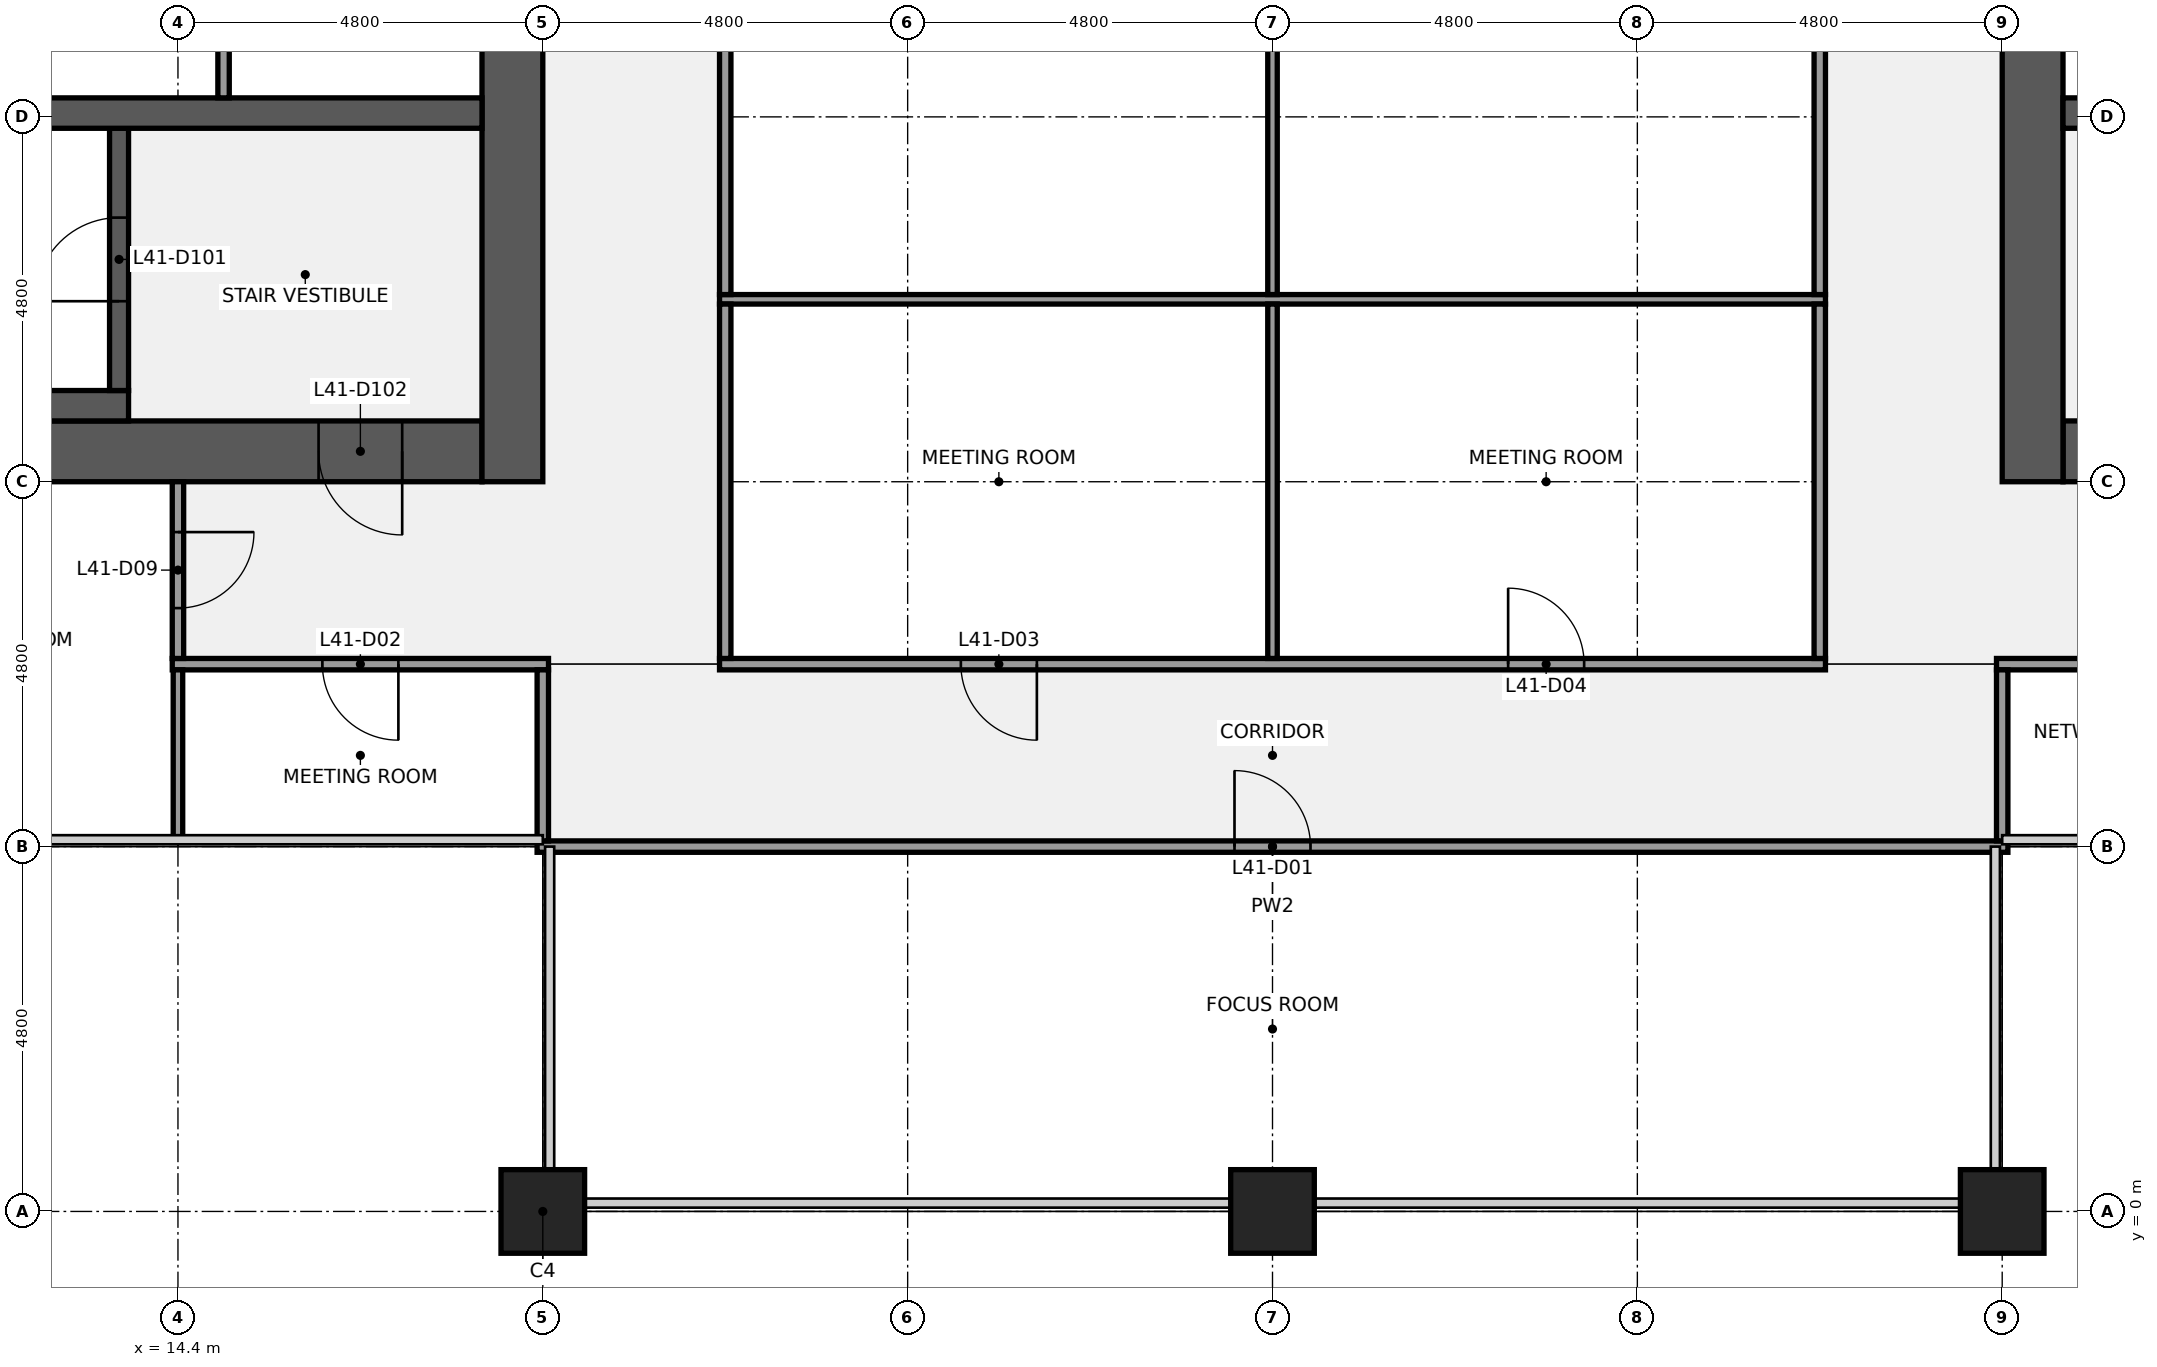
"""IFC4 building model, lengths in metres.
Left out: names, types, materials, properties, quantities, classifications, styles, units other than length and angle.
Written with IfcOpenShell. Run it as: python <this file> out.ifc"""

import sys

from ifc_helpers import new_model, si_unit, direction, frame, frame_2d, origin, origin_2d, place, context, subcontext, project, spatial, rectangle, extrude, element, fill, save


model = new_model("IFC4")
c1 = context("Model", 3, precision=1e-05, world=origin(), true_north=direction((0.0, 1.0)))
c2 = subcontext(c1, "Body", "Model", "MODEL_VIEW")
j1 = project(units=[si_unit("LENGTHUNIT", "METRE"), si_unit("PLANEANGLEUNIT", "RADIAN")], contexts=[c1])
p1 = place(None, origin())
s1 = spatial("IfcSite", under=j1, at=p1, CompositionType="ELEMENT")
p2 = place(p1, origin())
s2 = spatial("IfcBuilding", under=s1, at=p2, CompositionType="ELEMENT")
p3 = place(p2, frame((0.0, 0.0, 193.2)))
s3 = spatial("IfcBuildingStorey", under=s2, at=p3, CompositionType="ELEMENT", Elevation=193.2)
for number, where, z_axis, x_axis in (
    (1, (19.2, 0.0, 0.0), (0.0, 0.0, 1.0), (1.0, 0.0, 0.0)),
    (2, (28.8, 0.0, 0.0), (0.0, 0.0, 1.0), (1.0, 0.0, 0.0)),
    (3, (38.4, 0.0, 0.0), (0.0, 0.0, 1.0), (1.0, 0.0, 0.0)),
):
    element("IfcColumn", number, at=place(p3, frame(where, z_axis=z_axis, x_axis=x_axis)), inside=s3, PredefinedType="COLUMN", context=c2, shape_type="SweptSolid", body=[
        extrude(rectangle(XDim=1.1, YDim=1.1, at=origin_2d()), origin(), (0.0, 0.0, 1.0), 4.0),
    ])
p4 = place(p3, frame((18.4, 10.0, 0.0), z_axis=(0.0, 0.0, 1.0), x_axis=(-1.0, 0.0, 0.0)))
e4 = element("IfcWall", 4, at=p4, inside=s3, PredefinedType="SHEAR", context=c2, shape_type="SweptSolid", body=[
    extrude(rectangle(XDim=8.8, YDim=0.8, at=frame_2d((4.4, 0.0))), origin(), (0.0, 0.0, 1.0), 3.84),
])
p5 = place(p4, frame((1.05, 0.0, 0.0)))
e5 = element("IfcOpeningElement", 5, at=p5, cuts=e4, PredefinedType="OPENING", context=c2, shape_type="SweptSolid", body=[
    extrude(rectangle(XDim=1.1, YDim=2.1, at=frame_2d((0.55, 1.05))), frame((0.0, 0.41, 0.0), z_axis=(0.0, -1.0, 0.0), x_axis=(1.0, 0.0, 0.0)), (0.0, 0.0, 1.0), 0.82),
])
p6 = place(p3, frame((18.8, 38.4, 0.0), z_axis=(0.0, 0.0, 1.0), x_axis=(0.0, -1.0, 0.0)))
e6 = element("IfcWall", 6, at=p6, inside=s3, PredefinedType="SHEAR", context=c2, shape_type="SweptSolid", body=[
    extrude(rectangle(XDim=28.8, YDim=0.8, at=frame_2d((14.4, 0.0))), origin(), (0.0, 0.0, 1.0), 3.84),
])
p7 = place(p6, frame((18.3, 0.0, 0.0)))
e7 = element("IfcOpeningElement", 7, at=p7, cuts=e6, PredefinedType="OPENING", context=c2, shape_type="SweptSolid", body=[
    extrude(rectangle(XDim=1.8, YDim=2.1, at=frame_2d((0.9, 1.05))), frame((0.0, 0.41, 0.0), z_axis=(0.0, -1.0, 0.0), x_axis=(1.0, 0.0, 0.0)), (0.0, 0.0, 1.0), 0.82),
])
p8 = place(p6, frame((8.7, 0.0, 0.0)))
e8 = element("IfcOpeningElement", 8, at=p8, cuts=e6, PredefinedType="OPENING", context=c2, shape_type="SweptSolid", body=[
    extrude(rectangle(XDim=1.8, YDim=2.1, at=frame_2d((0.9, 1.05))), frame((0.0, 0.41, 0.0), z_axis=(0.0, -1.0, 0.0), x_axis=(1.0, 0.0, 0.0)), (0.0, 0.0, 1.0), 0.82),
])
p9 = place(p3, frame((9.6, 10.6, 0.0), z_axis=(0.0, 0.0, 1.0), x_axis=(1.0, 0.0, 0.0)))
e9 = element("IfcWall", 9, at=p9, inside=s3, PredefinedType="SHEAR", context=c2, shape_type="SweptSolid", body=[
    extrude(rectangle(XDim=4.15, YDim=0.4, at=frame_2d((2.075, 0.0))), origin(), (0.0, 0.0, 1.0), 3.84),
])
p10 = place(p3, frame((13.625, 10.8, 0.0), z_axis=(0.0, 0.0, 1.0), x_axis=(0.0, 1.0, 0.0)))
e10 = element("IfcWall", 10, at=p10, inside=s3, PredefinedType="SHEAR", context=c2, shape_type="SweptSolid", body=[
    extrude(rectangle(XDim=3.45, YDim=0.25, at=frame_2d((1.725, 0.0))), origin(), (0.0, 0.0, 1.0), 3.84),
])
p11 = place(p10, frame((1.175, 0.0, 0.0)))
e11 = element("IfcOpeningElement", 11, at=p11, cuts=e10, PredefinedType="OPENING", context=c2, shape_type="SweptSolid", body=[
    extrude(rectangle(XDim=1.1, YDim=2.1, at=frame_2d((0.55, 1.05))), frame((0.0, 0.135, 0.0), z_axis=(0.0, -1.0, 0.0), x_axis=(1.0, 0.0, 0.0)), (0.0, 0.0, 1.0), 0.27),
])
p12 = place(p3, frame((0.8, 14.45, 0.0), z_axis=(0.0, 0.0, 1.0), x_axis=(1.0, 0.0, 0.0)))
e12 = element("IfcWall", 12, at=p12, inside=s3, PredefinedType="SHEAR", context=c2, shape_type="SweptSolid", body=[
    extrude(rectangle(XDim=17.6, YDim=0.4, at=frame_2d((8.8, 0.0))), origin(), (0.0, 0.0, 1.0), 3.84),
])
p13 = place(p3, frame((15.0, 14.65, 0.0), z_axis=(0.0, 0.0, 1.0), x_axis=(0.0, 1.0, 0.0)))
e13 = element("IfcWall", 13, at=p13, inside=s3, PredefinedType="PARTITIONING", context=c2, shape_type="SweptSolid", body=[
    extrude(rectangle(XDim=2.6, YDim=0.15, at=frame_2d((1.3, 0.0))), origin(), (0.0, 0.0, 1.0), 3.84),
])
p14 = place(p3, frame((48.0, 10.0, 0.0), z_axis=(0.0, 0.0, 1.0), x_axis=(-1.0, 0.0, 0.0)))
e14 = element("IfcWall", 14, at=p14, inside=s3, PredefinedType="SHEAR", context=c2, shape_type="SweptSolid", body=[
    extrude(rectangle(XDim=8.8, YDim=0.8, at=frame_2d((4.4, 0.0))), origin(), (0.0, 0.0, 1.0), 3.84),
])
p15 = place(p14, frame((6.65, 0.0, 0.0)))
e15 = element("IfcOpeningElement", 15, at=p15, cuts=e14, PredefinedType="OPENING", context=c2, shape_type="SweptSolid", body=[
    extrude(rectangle(XDim=1.1, YDim=2.1, at=frame_2d((0.55, 1.05))), frame((0.0, 0.41, 0.0), z_axis=(0.0, -1.0, 0.0), x_axis=(1.0, 0.0, 0.0)), (0.0, 0.0, 1.0), 0.82),
])
p16 = place(p3, frame((38.8, 9.6, 0.0), z_axis=(0.0, 0.0, 1.0), x_axis=(0.0, 1.0, 0.0)))
e16 = element("IfcWall", 16, at=p16, inside=s3, PredefinedType="SHEAR", context=c2, shape_type="SweptSolid", body=[
    extrude(rectangle(XDim=28.8, YDim=0.8, at=frame_2d((14.4, 0.0))), origin(), (0.0, 0.0, 1.0), 3.84),
])
p17 = place(p16, frame((8.7, 0.0, 0.0)))
e17 = element("IfcOpeningElement", 17, at=p17, cuts=e16, PredefinedType="OPENING", context=c2, shape_type="SweptSolid", body=[
    extrude(rectangle(XDim=1.8, YDim=2.1, at=frame_2d((0.9, 1.05))), frame((0.0, 0.41, 0.0), z_axis=(0.0, -1.0, 0.0), x_axis=(1.0, 0.0, 0.0)), (0.0, 0.0, 1.0), 0.82),
])
p18 = place(p16, frame((18.3, 0.0, 0.0)))
e18 = element("IfcOpeningElement", 18, at=p18, cuts=e16, PredefinedType="OPENING", context=c2, shape_type="SweptSolid", body=[
    extrude(rectangle(XDim=1.8, YDim=2.1, at=frame_2d((0.9, 1.05))), frame((0.0, 0.41, 0.0), z_axis=(0.0, -1.0, 0.0), x_axis=(1.0, 0.0, 0.0)), (0.0, 0.0, 1.0), 0.82),
])
p19 = place(p3, frame((39.2, 14.45, 0.0), z_axis=(0.0, 0.0, 1.0), x_axis=(1.0, 0.0, 0.0)))
e19 = element("IfcWall", 19, at=p19, inside=s3, PredefinedType="SHEAR", context=c2, shape_type="SweptSolid", body=[
    extrude(rectangle(XDim=17.6, YDim=0.4, at=frame_2d((8.8, 0.0))), origin(), (0.0, 0.0, 1.0), 3.84),
])
p20 = place(p3, frame((19.125, 4.8, 0.0), z_axis=(0.0, 0.0, 1.0), x_axis=(1.0, 0.0, 0.0)))
e20 = element("IfcWall", 20, at=p20, inside=s3, PredefinedType="PARTITIONING", context=c2, shape_type="SweptSolid", body=[
    extrude(rectangle(XDim=19.35, YDim=0.15, at=frame_2d((9.675, 0.0))), origin(), (0.0, 0.0, 1.0), 2.849),
])
p21 = place(p20, frame((9.175, 0.0, 0.0)))
e21 = element("IfcOpeningElement", 21, at=p21, cuts=e20, PredefinedType="OPENING", context=c2, shape_type="SweptSolid", body=[
    extrude(rectangle(XDim=1.0, YDim=2.1, at=frame_2d((0.5, 1.05))), frame((0.0, 0.085, 0.0), z_axis=(0.0, -1.0, 0.0), x_axis=(1.0, 0.0, 0.0)), (0.0, 0.0, 1.0), 0.17),
])
p22 = place(p3, frame((14.325, 7.2, 0.0), z_axis=(0.0, 0.0, 1.0), x_axis=(1.0, 0.0, 0.0)))
e22 = element("IfcWall", 22, at=p22, inside=s3, PredefinedType="PARTITIONING", context=c2, shape_type="SweptSolid", body=[
    extrude(rectangle(XDim=4.95, YDim=0.15, at=frame_2d((2.475, 0.0))), origin(), (0.0, 0.0, 1.0), 2.849),
])
p23 = place(p22, frame((1.975, 0.0, 0.0)))
e23 = element("IfcOpeningElement", 23, at=p23, cuts=e22, PredefinedType="OPENING", context=c2, shape_type="SweptSolid", body=[
    extrude(rectangle(XDim=1.0, YDim=2.1, at=frame_2d((0.5, 1.05))), frame((0.0, 0.085, 0.0), z_axis=(0.0, -1.0, 0.0), x_axis=(1.0, 0.0, 0.0)), (0.0, 0.0, 1.0), 0.17),
])
p24 = place(p3, frame((21.525, 7.2, 0.0), z_axis=(0.0, 0.0, 1.0), x_axis=(1.0, 0.0, 0.0)))
e24 = element("IfcWall", 24, at=p24, inside=s3, PredefinedType="PARTITIONING", context=c2, shape_type="SweptSolid", body=[
    extrude(rectangle(XDim=14.55, YDim=0.15, at=frame_2d((7.275, 0.0))), origin(), (0.0, 0.0, 1.0), 2.849),
])
p25 = place(p24, frame((3.175, 0.0, 0.0)))
e25 = element("IfcOpeningElement", 25, at=p25, cuts=e24, PredefinedType="OPENING", context=c2, shape_type="SweptSolid", body=[
    extrude(rectangle(XDim=1.0, YDim=2.1, at=frame_2d((0.5, 1.05))), frame((0.0, 0.085, 0.0), z_axis=(0.0, -1.0, 0.0), x_axis=(1.0, 0.0, 0.0)), (0.0, 0.0, 1.0), 0.17),
])
p26 = place(p24, frame((10.375, 0.0, 0.0)))
e26 = element("IfcOpeningElement", 26, at=p26, cuts=e24, PredefinedType="OPENING", context=c2, shape_type="SweptSolid", body=[
    extrude(rectangle(XDim=1.0, YDim=2.1, at=frame_2d((0.5, 1.05))), frame((0.0, 0.085, 0.0), z_axis=(0.0, -1.0, 0.0), x_axis=(1.0, 0.0, 0.0)), (0.0, 0.0, 1.0), 0.17),
])
p27 = place(p3, frame((38.325, 7.2, 0.0), z_axis=(0.0, 0.0, 1.0), x_axis=(1.0, 0.0, 0.0)))
e27 = element("IfcWall", 27, at=p27, inside=s3, PredefinedType="PARTITIONING", context=c2, shape_type="SweptSolid", body=[
    extrude(rectangle(XDim=4.95, YDim=0.15, at=frame_2d((2.475, 0.0))), origin(), (0.0, 0.0, 1.0), 2.849),
])
p28 = place(p27, frame((1.975, 0.0, 0.0)))
e28 = element("IfcOpeningElement", 28, at=p28, cuts=e27, PredefinedType="OPENING", context=c2, shape_type="SweptSolid", body=[
    extrude(rectangle(XDim=1.0, YDim=2.1, at=frame_2d((0.5, 1.05))), frame((0.0, 0.085, 0.0), z_axis=(0.0, -1.0, 0.0), x_axis=(1.0, 0.0, 0.0)), (0.0, 0.0, 1.0), 0.17),
])
p29 = place(p3, frame((21.525, 12.0, 0.0), z_axis=(0.0, 0.0, 1.0), x_axis=(1.0, 0.0, 0.0)))
e29 = element("IfcWall", 29, at=p29, inside=s3, PredefinedType="PARTITIONING", context=c2, shape_type="SweptSolid", body=[
    extrude(rectangle(XDim=14.55, YDim=0.125, at=frame_2d((7.275, 0.0))), origin(), (0.0, 0.0, 1.0), 2.849),
])
p30 = place(p3, frame((14.4, 4.9, 0.0), z_axis=(0.0, 0.0, 1.0), x_axis=(0.0, 1.0, 0.0)))
e30 = element("IfcWall", 30, at=p30, inside=s3, PredefinedType="PARTITIONING", context=c2, shape_type="SweptSolid", body=[
    extrude(rectangle(XDim=2.225, YDim=0.125, at=frame_2d((1.113, 0.0))), origin(), (0.0, 0.0, 1.0), 2.849),
])
p31 = place(p3, frame((14.4, 7.275, 0.0), z_axis=(0.0, 0.0, 1.0), x_axis=(0.0, 1.0, 0.0)))
e31 = element("IfcWall", 31, at=p31, inside=s3, PredefinedType="PARTITIONING", context=c2, shape_type="SweptSolid", body=[
    extrude(rectangle(XDim=2.325, YDim=0.15, at=frame_2d((1.163, 0.0))), origin(), (0.0, 0.0, 1.0), 2.849),
])
p32 = place(p31, frame((0.663, 0.0, 0.0)))
e32 = element("IfcOpeningElement", 32, at=p32, cuts=e31, PredefinedType="OPENING", context=c2, shape_type="SweptSolid", body=[
    extrude(rectangle(XDim=1.0, YDim=2.1, at=frame_2d((0.5, 1.05))), frame((0.0, 0.085, 0.0), z_axis=(0.0, -1.0, 0.0), x_axis=(1.0, 0.0, 0.0)), (0.0, 0.0, 1.0), 0.17),
])
p33 = place(p3, frame((19.2, 4.875, 0.0), z_axis=(0.0, 0.0, 1.0), x_axis=(0.0, 1.0, 0.0)))
e33 = element("IfcWall", 33, at=p33, inside=s3, PredefinedType="PARTITIONING", context=c2, shape_type="SweptSolid", body=[
    extrude(rectangle(XDim=2.25, YDim=0.15, at=frame_2d((1.125, 0.0))), origin(), (0.0, 0.0, 1.0), 2.849),
])
p34 = place(p3, frame((21.6, 7.275, 0.0), z_axis=(0.0, 0.0, 1.0), x_axis=(0.0, 1.0, 0.0)))
e34 = element("IfcWall", 34, at=p34, inside=s3, PredefinedType="PARTITIONING", context=c2, shape_type="SweptSolid", body=[
    extrude(rectangle(XDim=4.663, YDim=0.15, at=frame_2d((2.331, 0.0))), origin(), (0.0, 0.0, 1.0), 2.849),
])
p35 = place(p3, frame((21.6, 12.062, 0.0), z_axis=(0.0, 0.0, 1.0), x_axis=(0.0, 1.0, 0.0)))
e35 = element("IfcWall", 35, at=p35, inside=s3, PredefinedType="PARTITIONING", context=c2, shape_type="SweptSolid", body=[
    extrude(rectangle(XDim=9.475, YDim=0.15, at=frame_2d((4.738, 0.0))), origin(), (0.0, 0.0, 1.0), 2.849),
])
p36 = place(p35, frame((4.238, 0.0, 0.0)))
e36 = element("IfcOpeningElement", 36, at=p36, cuts=e35, PredefinedType="OPENING", context=c2, shape_type="SweptSolid", body=[
    extrude(rectangle(XDim=1.0, YDim=2.1, at=frame_2d((0.5, 1.05))), frame((0.0, 0.085, 0.0), z_axis=(0.0, -1.0, 0.0), x_axis=(1.0, 0.0, 0.0)), (0.0, 0.0, 1.0), 0.17),
])
p37 = place(p3, frame((28.8, 7.275, 0.0), z_axis=(0.0, 0.0, 1.0), x_axis=(0.0, 1.0, 0.0)))
e37 = element("IfcWall", 37, at=p37, inside=s3, PredefinedType="PARTITIONING", context=c2, shape_type="SweptSolid", body=[
    extrude(rectangle(XDim=4.663, YDim=0.125, at=frame_2d((2.331, 0.0))), origin(), (0.0, 0.0, 1.0), 2.849),
])
p38 = place(p3, frame((28.8, 12.062, 0.0), z_axis=(0.0, 0.0, 1.0), x_axis=(0.0, 1.0, 0.0)))
e38 = element("IfcWall", 38, at=p38, inside=s3, PredefinedType="PARTITIONING", context=c2, shape_type="SweptSolid", body=[
    extrude(rectangle(XDim=9.475, YDim=0.125, at=frame_2d((4.738, 0.0))), origin(), (0.0, 0.0, 1.0), 2.849),
])
p39 = place(p3, frame((36.0, 7.275, 0.0), z_axis=(0.0, 0.0, 1.0), x_axis=(0.0, 1.0, 0.0)))
e39 = element("IfcWall", 39, at=p39, inside=s3, PredefinedType="PARTITIONING", context=c2, shape_type="SweptSolid", body=[
    extrude(rectangle(XDim=4.663, YDim=0.15, at=frame_2d((2.331, 0.0))), origin(), (0.0, 0.0, 1.0), 2.849),
])
p40 = place(p3, frame((36.0, 12.062, 0.0), z_axis=(0.0, 0.0, 1.0), x_axis=(0.0, 1.0, 0.0)))
e40 = element("IfcWall", 40, at=p40, inside=s3, PredefinedType="PARTITIONING", context=c2, shape_type="SweptSolid", body=[
    extrude(rectangle(XDim=9.475, YDim=0.15, at=frame_2d((4.738, 0.0))), origin(), (0.0, 0.0, 1.0), 2.849),
])
p41 = place(p40, frame((4.238, 0.0, 0.0)))
e41 = element("IfcOpeningElement", 41, at=p41, cuts=e40, PredefinedType="OPENING", context=c2, shape_type="SweptSolid", body=[
    extrude(rectangle(XDim=1.0, YDim=2.1, at=frame_2d((0.5, 1.05))), frame((0.0, 0.085, 0.0), z_axis=(0.0, -1.0, 0.0), x_axis=(1.0, 0.0, 0.0)), (0.0, 0.0, 1.0), 0.17),
])
p42 = place(p3, frame((38.4, 4.875, 0.0), z_axis=(0.0, 0.0, 1.0), x_axis=(0.0, 1.0, 0.0)))
e42 = element("IfcWall", 42, at=p42, inside=s3, PredefinedType="PARTITIONING", context=c2, shape_type="SweptSolid", body=[
    extrude(rectangle(XDim=2.25, YDim=0.15, at=frame_2d((1.125, 0.0))), origin(), (0.0, 0.0, 1.0), 2.849),
])
for number, where, z_axis, x_axis in (
    (43, (19.2, -1.025, 0.0), (0.0, 0.0, 1.0), (1.0, 0.0, 0.0)),
    (44, (38.4, -1.025, 0.0), (0.0, 0.0, 1.0), (1.0, 0.0, 0.0)),
):
    element("IfcColumn", number, at=place(p3, frame(where, z_axis=z_axis, x_axis=x_axis)), inside=s3, PredefinedType="PILASTER", context=c2, shape_type="SweptSolid", body=[
        extrude(rectangle(XDim=2.4, YDim=0.95, at=origin_2d()), origin(), (0.0, 0.0, 1.0), 4.0),
    ])
p43 = place(p11, origin())
e45 = element("IfcDoor", 45, at=p43, inside=s3, OperationType="SINGLE_SWING_LEFT", PredefinedType="DOOR", context=c2, shape_type="SweptSolid", body=[
    extrude(rectangle(XDim=1.1, YDim=2.1, at=frame_2d((0.55, 1.05))), frame((0.0, 0.025, 0.0), z_axis=(0.0, -1.0, 0.0), x_axis=(1.0, 0.0, 0.0)), (0.0, 0.0, 1.0), 0.05),
])
fill(e11, e45)
p44 = place(p5, origin())
e46 = element("IfcDoor", 46, at=p44, inside=s3, OperationType="SINGLE_SWING_LEFT", PredefinedType="DOOR", context=c2, shape_type="SweptSolid", body=[
    extrude(rectangle(XDim=1.1, YDim=2.1, at=frame_2d((0.55, 1.05))), frame((0.0, 0.025, 0.0), z_axis=(0.0, -1.0, 0.0), x_axis=(1.0, 0.0, 0.0)), (0.0, 0.0, 1.0), 0.05),
])
fill(e5, e46)
p45 = place(p21, origin())
e47 = element("IfcDoor", 47, at=p45, inside=s3, OperationType="SINGLE_SWING_LEFT", PredefinedType="DOOR", context=c2, shape_type="SweptSolid", body=[
    extrude(rectangle(XDim=1.0, YDim=2.1, at=frame_2d((0.5, 1.05))), frame((0.0, 0.025, 0.0), z_axis=(0.0, -1.0, 0.0), x_axis=(1.0, 0.0, 0.0)), (0.0, 0.0, 1.0), 0.05),
])
fill(e21, e47)
p46 = place(p23, origin())
e48 = element("IfcDoor", 48, at=p46, inside=s3, OperationType="SINGLE_SWING_RIGHT", PredefinedType="DOOR", context=c2, shape_type="SweptSolid", body=[
    extrude(rectangle(XDim=1.0, YDim=2.1, at=frame_2d((0.5, 1.05))), frame((0.0, 0.025, 0.0), z_axis=(0.0, -1.0, 0.0), x_axis=(1.0, 0.0, 0.0)), (0.0, 0.0, 1.0), 0.05),
])
fill(e23, e48)
p47 = place(p25, origin())
e49 = element("IfcDoor", 49, at=p47, inside=s3, OperationType="SINGLE_SWING_RIGHT", PredefinedType="DOOR", context=c2, shape_type="SweptSolid", body=[
    extrude(rectangle(XDim=1.0, YDim=2.1, at=frame_2d((0.5, 1.05))), frame((0.0, 0.025, 0.0), z_axis=(0.0, -1.0, 0.0), x_axis=(1.0, 0.0, 0.0)), (0.0, 0.0, 1.0), 0.05),
])
fill(e25, e49)
p48 = place(p26, origin())
e50 = element("IfcDoor", 50, at=p48, inside=s3, OperationType="SINGLE_SWING_LEFT", PredefinedType="DOOR", context=c2, shape_type="SweptSolid", body=[
    extrude(rectangle(XDim=1.0, YDim=2.1, at=frame_2d((0.5, 1.05))), frame((0.0, 0.025, 0.0), z_axis=(0.0, -1.0, 0.0), x_axis=(1.0, 0.0, 0.0)), (0.0, 0.0, 1.0), 0.05),
])
fill(e26, e50)
p49 = place(p32, origin())
e51 = element("IfcDoor", 51, at=p49, inside=s3, OperationType="SINGLE_SWING_RIGHT", PredefinedType="DOOR", context=c2, shape_type="SweptSolid", body=[
    extrude(rectangle(XDim=1.0, YDim=2.1, at=frame_2d((0.5, 1.05))), frame((0.0, 0.025, 0.0), z_axis=(0.0, -1.0, 0.0), x_axis=(1.0, 0.0, 0.0)), (0.0, 0.0, 1.0), 0.05),
])
fill(e32, e51)
save(model, sys.argv[1])
